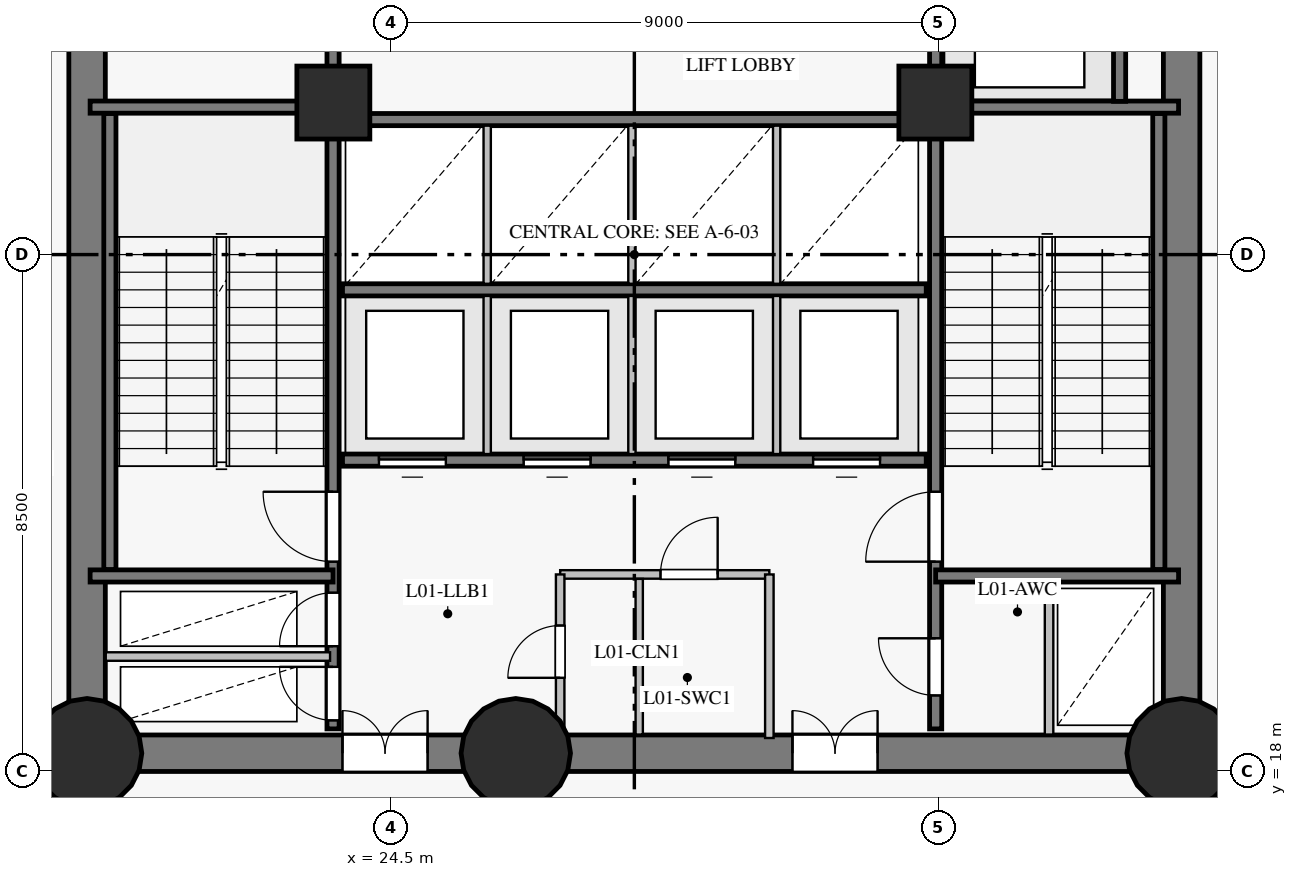
"""IFC4 building model, lengths in metres.
Left out: names, types, materials, properties, quantities, classifications, styles, units other than length and angle.
Written with IfcOpenShell. Run it as: python <this file> out.ifc"""

import sys

from ifc_helpers import new_model, si_unit, direction, frame, frame_2d, origin, origin_with_axes, origin_2d, place, context, subcontext, project, spatial, rectangle, circle, extrude, source, transform, mapped, element, fill, save


model = new_model("IFC4")
c1 = context("Model", 3, precision=1e-05, world=origin(), true_north=direction((0.0, 1.0)))
c2 = subcontext(c1, "Body", "Model", "MODEL_VIEW")
j1 = project(units=[si_unit("LENGTHUNIT", "METRE"), si_unit("PLANEANGLEUNIT", "RADIAN")], contexts=[c1])
p1 = place(None, origin())
s1 = spatial("IfcSite", under=j1, at=p1, CompositionType="ELEMENT")
p2 = place(p1, origin())
s2 = spatial("IfcBuilding", under=s1, at=p2, CompositionType="ELEMENT")
p3 = place(p2, frame((0.0, 0.0, 4.5)))
s3 = spatial("IfcBuildingStorey", under=s2, at=p3, CompositionType="ELEMENT", Elevation=4.5)
p4 = place(p3, frame((19.5, 18.3, 0.0), z_axis=(0.0, 0.0, 1.0), x_axis=(1.0, 0.0, 0.0)))
e1 = element("IfcWall", 1, at=p4, inside=s3, PredefinedType="SHEAR", context=c2, shape_type="SweptSolid", body=[
    extrude(rectangle(XDim=7.05, YDim=0.6, at=frame_2d((3.525, 0.0))), origin(), (0.0, 0.0, 1.0), 4.2),
])
p5 = place(p4, frame((4.2, 0.0, 0.0)))
e2 = element("IfcOpeningElement", 2, at=p5, cuts=e1, PredefinedType="OPENING", context=c2, shape_type="SweptSolid", body=[
    extrude(rectangle(XDim=1.4, YDim=2.2, at=frame_2d((0.7, 1.1))), frame((0.0, 0.31, 0.0), z_axis=(0.0, -1.0, 0.0), x_axis=(1.0, 0.0, 0.0)), (0.0, 0.0, 1.0), 0.62),
])
p6 = place(p3, frame((26.55, 18.3, 0.0), z_axis=(0.0, 0.0, 1.0), x_axis=(1.0, 0.0, 0.0)))
e3 = element("IfcWall", 3, at=p6, inside=s3, PredefinedType="SHEAR", context=c2, shape_type="SweptSolid", body=[
    extrude(rectangle(XDim=10.95, YDim=0.6, at=frame_2d((5.475, 0.0))), origin(), (0.0, 0.0, 1.0), 4.2),
])
p7 = place(p6, frame((4.55, 0.0, 0.0)))
e4 = element("IfcOpeningElement", 4, at=p7, cuts=e3, PredefinedType="OPENING", context=c2, shape_type="SweptSolid", body=[
    extrude(rectangle(XDim=1.4, YDim=2.2, at=frame_2d((0.7, 1.1))), frame((0.0, 0.31, 0.0), z_axis=(0.0, -1.0, 0.0), x_axis=(1.0, 0.0, 0.0)), (0.0, 0.0, 1.0), 0.62),
])
p8 = place(p3, frame((37.5, 18.3, 0.0), z_axis=(0.0, 0.0, 1.0), x_axis=(0.0, 1.0, 0.0)))
e5 = element("IfcWall", 5, at=p8, inside=s3, PredefinedType="SHEAR", context=c2, shape_type="SweptSolid", body=[
    extrude(rectangle(XDim=16.4, YDim=0.6, at=frame_2d((8.2, 0.0))), origin(), (0.0, 0.0, 1.0), 4.2),
])
p9 = place(p8, frame((13.96, 0.0, 0.0)))
e6 = element("IfcOpeningElement", 6, at=p9, cuts=e5, PredefinedType="OPENING", context=c2, shape_type="SweptSolid", body=[
    extrude(rectangle(XDim=1.2, YDim=2.15, at=frame_2d((0.6, 1.075))), frame((0.0, 0.31, 0.0), z_axis=(0.0, -1.0, 0.0), x_axis=(1.0, 0.0, 0.0)), (0.0, 0.0, 1.0), 0.62),
])
p10 = place(p3, frame((19.5, 34.7, 0.0), z_axis=(0.0, 0.0, 1.0), x_axis=(0.0, -1.0, 0.0)))
e7 = element("IfcWall", 7, at=p10, inside=s3, PredefinedType="SHEAR", context=c2, shape_type="SweptSolid", body=[
    extrude(rectangle(XDim=16.4, YDim=0.6, at=frame_2d((8.2, 0.0))), origin(), (0.0, 0.0, 1.0), 4.2),
])
p11 = place(p10, frame((3.1, 0.0, 0.0)))
e8 = element("IfcOpeningElement", 8, at=p11, cuts=e7, PredefinedType="OPENING", context=c2, shape_type="SweptSolid", body=[
    extrude(rectangle(XDim=1.1, YDim=2.15, at=frame_2d((0.55, 1.075))), frame((0.0, 0.31, 0.0), z_axis=(0.0, -1.0, 0.0), x_axis=(1.0, 0.0, 0.0)), (0.0, 0.0, 1.0), 0.62),
])
m1 = source(origin_with_axes(), c2, "Body", "SweptSolid", [
    extrude(circle(Radius=0.9, at=origin_2d()), origin(), (0.0, 0.0, 1.0), 4.5),
])
for number, where, z_axis, x_axis in (
    (9, (19.5, 18.3, 0.0), (0.0, 0.0, 1.0), (1.0, 0.0, 0.0)),
    (10, (26.55, 18.3, 0.0), (0.0, 0.0, 1.0), (1.0, 0.0, 0.0)),
    (11, (37.5, 18.3, 0.0), (0.0, 0.0, 1.0), (1.0, 0.0, 0.0)),
):
    element("IfcColumn", number, at=place(p3, frame(where, z_axis=z_axis, x_axis=x_axis)), inside=s3, PredefinedType="COLUMN", context=c2, shape_type="MappedRepresentation", body=[
        mapped(m1, transform((0.0, 0.0, 0.0), scale=1.0)),
    ])
m2 = source(origin_with_axes(), c2, "Body", "SweptSolid", [
    extrude(rectangle(XDim=1.2, YDim=1.2, at=origin_2d()), origin(), (0.0, 0.0, 1.0), 4.5),
])
for number, where, z_axis, x_axis in (
    (12, (23.55, 29.0, 0.0), (0.0, 0.0, 1.0), (1.0, 0.0, 0.0)),
    (13, (33.45, 29.0, 0.0), (0.0, 0.0, 1.0), (1.0, 0.0, 0.0)),
):
    element("IfcColumn", number, at=place(p3, frame(where, z_axis=z_axis, x_axis=x_axis)), inside=s3, PredefinedType="COLUMN", context=c2, shape_type="MappedRepresentation", body=[
        mapped(m2, transform((0.0, 0.0, 0.0), scale=1.0)),
    ])
p12 = place(p3, frame((23.545, 18.7, 0.0), z_axis=(0.0, 0.0, 1.0), x_axis=(0.0, 1.0, 0.0)))
e14 = element("IfcWall", 14, at=p12, inside=s3, PredefinedType="SHEAR", context=c2, shape_type="SweptSolid", body=[
    extrude(rectangle(XDim=15.6, YDim=0.2, at=frame_2d((7.8, 0.0))), origin(), (0.0, 0.0, 1.0), 4.2),
])
p13 = place(p12, frame((2.75, 0.0, 0.0)))
e15 = element("IfcOpeningElement", 15, at=p13, cuts=e14, PredefinedType="OPENING", context=c2, shape_type="SweptSolid", body=[
    extrude(rectangle(XDim=1.15, YDim=2.15, at=frame_2d((0.575, 1.075))), frame((0.0, 0.11, 0.0), z_axis=(0.0, -1.0, 0.0), x_axis=(1.0, 0.0, 0.0)), (0.0, 0.0, 1.0), 0.22),
])
p14 = place(p12, frame((0.14, 0.0, 0.0)))
e16 = element("IfcOpeningElement", 16, at=p14, cuts=e14, PredefinedType="OPENING", context=c2, shape_type="SweptSolid", body=[
    extrude(rectangle(XDim=0.88, YDim=2.1, at=frame_2d((0.44, 1.05))), frame((0.0, 0.11, 0.0), z_axis=(0.0, -1.0, 0.0), x_axis=(1.0, 0.0, 0.0)), (0.0, 0.0, 1.0), 0.22),
])
p15 = place(p12, frame((1.36, 0.0, 0.0)))
e17 = element("IfcOpeningElement", 17, at=p15, cuts=e14, PredefinedType="OPENING", context=c2, shape_type="SweptSolid", body=[
    extrude(rectangle(XDim=0.88, YDim=2.1, at=frame_2d((0.44, 1.05))), frame((0.0, 0.11, 0.0), z_axis=(0.0, -1.0, 0.0), x_axis=(1.0, 0.0, 0.0)), (0.0, 0.0, 1.0), 0.22),
])
p16 = place(p12, frame((12.1, 0.0, 0.0)))
e18 = element("IfcOpeningElement", 18, at=p16, cuts=e14, PredefinedType="OPENING", context=c2, shape_type="SweptSolid", body=[
    extrude(rectangle(XDim=1.12, YDim=2.15, at=frame_2d((0.56, 1.075))), frame((0.0, 0.11, 0.0), z_axis=(0.0, -1.0, 0.0), x_axis=(1.0, 0.0, 0.0)), (0.0, 0.0, 1.0), 0.22),
])
p17 = place(p12, frame((14.05, 0.0, 0.0)))
e19 = element("IfcOpeningElement", 19, at=p17, cuts=e14, PredefinedType="OPENING", context=c2, shape_type="SweptSolid", body=[
    extrude(rectangle(XDim=1.12, YDim=2.15, at=frame_2d((0.56, 1.075))), frame((0.0, 0.11, 0.0), z_axis=(0.0, -1.0, 0.0), x_axis=(1.0, 0.0, 0.0)), (0.0, 0.0, 1.0), 0.22),
])
p18 = place(p3, frame((33.455, 18.7, 0.0), z_axis=(0.0, 0.0, 1.0), x_axis=(0.0, 1.0, 0.0)))
e20 = element("IfcWall", 20, at=p18, inside=s3, PredefinedType="SHEAR", context=c2, shape_type="SweptSolid", body=[
    extrude(rectangle(XDim=15.6, YDim=0.2, at=frame_2d((7.8, 0.0))), origin(), (0.0, 0.0, 1.0), 4.2),
])
p19 = place(p18, frame((2.75, 0.0, 0.0)))
e21 = element("IfcOpeningElement", 21, at=p19, cuts=e20, PredefinedType="OPENING", context=c2, shape_type="SweptSolid", body=[
    extrude(rectangle(XDim=1.15, YDim=2.15, at=frame_2d((0.575, 1.075))), frame((0.0, 0.11, 0.0), z_axis=(0.0, -1.0, 0.0), x_axis=(1.0, 0.0, 0.0)), (0.0, 0.0, 1.0), 0.22),
])
p20 = place(p18, frame((0.55, 0.0, 0.0)))
e22 = element("IfcOpeningElement", 22, at=p20, cuts=e20, PredefinedType="OPENING", context=c2, shape_type="SweptSolid", body=[
    extrude(rectangle(XDim=0.94, YDim=2.1, at=frame_2d((0.47, 1.05))), frame((0.0, 0.11, 0.0), z_axis=(0.0, -1.0, 0.0), x_axis=(1.0, 0.0, 0.0)), (0.0, 0.0, 1.0), 0.22),
])
p21 = place(p3, frame((23.7, 23.12, 0.0), z_axis=(0.0, 0.0, 1.0), x_axis=(1.0, 0.0, 0.0)))
e23 = element("IfcWall", 23, at=p21, inside=s3, PredefinedType="SHEAR", context=c2, shape_type="SweptSolid", body=[
    extrude(rectangle(XDim=9.6, YDim=0.2, at=frame_2d((4.8, 0.0))), origin(), (0.0, 0.0, 1.0), 4.2),
])
p22 = place(p21, frame((0.6, 0.0, 0.0)))
e24 = element("IfcOpeningElement", 24, at=p22, cuts=e23, PredefinedType="OPENING", context=c2, shape_type="SweptSolid", body=[
    extrude(rectangle(XDim=1.1, YDim=2.15, at=frame_2d((0.55, 1.075))), frame((0.0, 0.11, 0.0), z_axis=(0.0, -1.0, 0.0), x_axis=(1.0, 0.0, 0.0)), (0.0, 0.0, 1.0), 0.22),
])
p23 = place(p21, frame((2.98, 0.0, 0.0)))
e25 = element("IfcOpeningElement", 25, at=p23, cuts=e23, PredefinedType="OPENING", context=c2, shape_type="SweptSolid", body=[
    extrude(rectangle(XDim=1.1, YDim=2.15, at=frame_2d((0.55, 1.075))), frame((0.0, 0.11, 0.0), z_axis=(0.0, -1.0, 0.0), x_axis=(1.0, 0.0, 0.0)), (0.0, 0.0, 1.0), 0.22),
])
p24 = place(p21, frame((5.36, 0.0, 0.0)))
e26 = element("IfcOpeningElement", 26, at=p24, cuts=e23, PredefinedType="OPENING", context=c2, shape_type="SweptSolid", body=[
    extrude(rectangle(XDim=1.1, YDim=2.15, at=frame_2d((0.55, 1.075))), frame((0.0, 0.11, 0.0), z_axis=(0.0, -1.0, 0.0), x_axis=(1.0, 0.0, 0.0)), (0.0, 0.0, 1.0), 0.22),
])
p25 = place(p21, frame((7.74, 0.0, 0.0)))
e27 = element("IfcOpeningElement", 27, at=p25, cuts=e23, PredefinedType="OPENING", context=c2, shape_type="SweptSolid", body=[
    extrude(rectangle(XDim=1.1, YDim=2.15, at=frame_2d((0.55, 1.075))), frame((0.0, 0.11, 0.0), z_axis=(0.0, -1.0, 0.0), x_axis=(1.0, 0.0, 0.0)), (0.0, 0.0, 1.0), 0.22),
])
for number, where, z_axis, x_axis in (
    (28, (23.7, 25.92, 0.0), (0.0, 0.0, 1.0), (1.0, 0.0, 0.0)),
    (29, (23.7, 28.72, 0.0), (0.0, 0.0, 1.0), (1.0, 0.0, 0.0)),
):
    element("IfcWall", number, at=place(p3, frame(where, z_axis=z_axis, x_axis=x_axis)), inside=s3, PredefinedType="SHEAR", context=c2, shape_type="SweptSolid", body=[
        extrude(rectangle(XDim=9.6, YDim=0.2, at=frame_2d((4.8, 0.0))), origin(), (0.0, 0.0, 1.0), 4.2),
    ])
for number, where, z_axis, x_axis in (
    (30, (19.875, 21.32, 0.0), (0.0, 0.0, 1.0), (0.0, 1.0, 0.0)),
    (31, (37.125, 21.32, 0.0), (0.0, 0.0, 1.0), (0.0, 1.0, 0.0)),
):
    element("IfcWall", number, at=place(p3, frame(where, z_axis=z_axis, x_axis=x_axis)), inside=s3, PredefinedType="SHEAR", context=c2, shape_type="SweptSolid", body=[
        extrude(rectangle(XDim=7.5, YDim=0.2, at=frame_2d((3.75, 0.0))), origin(), (0.0, 0.0, 1.0), 4.2),
    ])
for number, where, z_axis, x_axis in (
    (32, (33.455, 21.215, 0.0), (0.0, 0.0, 1.0), (1.0, 0.0, 0.0)),
    (33, (33.455, 28.925, 0.0), (0.0, 0.0, 1.0), (1.0, 0.0, 0.0)),
    (34, (19.55, 21.215, 0.0), (0.0, 0.0, 1.0), (1.0, 0.0, 0.0)),
    (35, (19.55, 28.925, 0.0), (0.0, 0.0, 1.0), (1.0, 0.0, 0.0)),
):
    element("IfcWall", number, at=place(p3, frame(where, z_axis=z_axis, x_axis=x_axis)), inside=s3, PredefinedType="SHEAR", context=c2, shape_type="SweptSolid", body=[
        extrude(rectangle(XDim=3.995, YDim=0.2, at=frame_2d((1.998, 0.0))), origin(), (0.0, 0.0, 1.0), 4.2),
    ])
p26 = place(p3, frame((36.48, 29.02, 0.0), z_axis=(0.0, 0.0, 1.0), x_axis=(0.0, 1.0, 0.0)))
e36 = element("IfcWall", 36, at=p26, inside=s3, PredefinedType="SHEAR", context=c2, shape_type="SweptSolid", body=[
    extrude(rectangle(XDim=2.86, YDim=0.2, at=frame_2d((1.43, 0.0))), origin(), (0.0, 0.0, 1.0), 4.2),
])
p27 = place(p3, frame((19.807, 19.89, 0.0), z_axis=(0.0, 0.0, 1.0), x_axis=(1.0, 0.0, 0.0)))
e37 = element("IfcWall", 37, at=p27, inside=s3, PredefinedType="PARTITIONING", context=c2, shape_type="SweptSolid", body=[
    extrude(rectangle(XDim=3.689, YDim=0.14, at=frame_2d((1.844, 0.0))), origin(), (0.0, 0.0, 1.0), 4.2),
])
p28 = place(p3, frame((27.28, 21.24, 0.0), z_axis=(0.0, 0.0, 1.0), x_axis=(1.0, 0.0, 0.0)))
e38 = element("IfcWall", 38, at=p28, inside=s3, PredefinedType="PARTITIONING", context=c2, shape_type="SweptSolid", body=[
    extrude(rectangle(XDim=3.44, YDim=0.14, at=frame_2d((1.72, 0.0))), origin(), (0.0, 0.0, 1.0), 4.2),
])
p29 = place(p28, frame((1.65, 0.0, 0.0)))
e39 = element("IfcOpeningElement", 39, at=p29, cuts=e38, PredefinedType="OPENING", context=c2, shape_type="SweptSolid", body=[
    extrude(rectangle(XDim=0.94, YDim=2.1, at=frame_2d((0.47, 1.05))), frame((0.0, 0.08, 0.0), z_axis=(0.0, -1.0, 0.0), x_axis=(1.0, 0.0, 0.0)), (0.0, 0.0, 1.0), 0.16),
])
p30 = place(p3, frame((27.28, 18.55, 0.0), z_axis=(0.0, 0.0, 1.0), x_axis=(0.0, 1.0, 0.0)))
e40 = element("IfcWall", 40, at=p30, inside=s3, PredefinedType="PARTITIONING", context=c2, shape_type="SweptSolid", body=[
    extrude(rectangle(XDim=2.69, YDim=0.14, at=frame_2d((1.345, 0.0))), origin(), (0.0, 0.0, 1.0), 4.2),
])
p31 = place(p30, frame((0.99, 0.0, 0.0)))
e41 = element("IfcOpeningElement", 41, at=p31, cuts=e40, PredefinedType="OPENING", context=c2, shape_type="SweptSolid", body=[
    extrude(rectangle(XDim=0.86, YDim=2.1, at=frame_2d((0.43, 1.05))), frame((0.0, 0.08, 0.0), z_axis=(0.0, -1.0, 0.0), x_axis=(1.0, 0.0, 0.0)), (0.0, 0.0, 1.0), 0.16),
])
p32 = place(p3, frame((30.72, 18.55, 0.0), z_axis=(0.0, 0.0, 1.0), x_axis=(0.0, 1.0, 0.0)))
e42 = element("IfcWall", 42, at=p32, inside=s3, PredefinedType="PARTITIONING", context=c2, shape_type="SweptSolid", body=[
    extrude(rectangle(XDim=2.69, YDim=0.14, at=frame_2d((1.345, 0.0))), origin(), (0.0, 0.0, 1.0), 4.2),
])
for number, where, z_axis, x_axis in (
    (43, (26.08, 23.22, 0.0), (0.0, 0.0, 1.0), (0.0, 1.0, 0.0)),
    (44, (28.46, 23.22, 0.0), (0.0, 0.0, 1.0), (0.0, 1.0, 0.0)),
    (45, (30.84, 23.22, 0.0), (0.0, 0.0, 1.0), (0.0, 1.0, 0.0)),
    (46, (26.08, 26.02, 0.0), (0.0, 0.0, 1.0), (0.0, 1.0, 0.0)),
    (47, (28.46, 26.02, 0.0), (0.0, 0.0, 1.0), (0.0, 1.0, 0.0)),
    (48, (30.84, 26.02, 0.0), (0.0, 0.0, 1.0), (0.0, 1.0, 0.0)),
):
    element("IfcWall", number, at=place(p3, frame(where, z_axis=z_axis, x_axis=x_axis)), inside=s3, PredefinedType="PARTITIONING", context=c2, shape_type="SweptSolid", body=[
        extrude(rectangle(XDim=2.6, YDim=0.12, at=frame_2d((1.3, 0.0))), origin(), (0.0, 0.0, 1.0), 4.2),
    ])
p33 = place(p3, frame((28.58, 18.607, 0.0), z_axis=(0.0, 0.0, 1.0), x_axis=(0.0, 1.0, 0.0)))
e49 = element("IfcWall", 49, at=p33, inside=s3, PredefinedType="PARTITIONING", context=c2, shape_type="SweptSolid", body=[
    extrude(rectangle(XDim=2.56, YDim=0.12, at=frame_2d((1.28, 0.0))), origin(), (0.0, 0.0, 1.0), 4.2),
])
p34 = place(p3, frame((35.32, 18.607, 0.0), z_axis=(0.0, 0.0, 1.0), x_axis=(0.0, 1.0, 0.0)))
e50 = element("IfcWall", 50, at=p34, inside=s3, PredefinedType="PARTITIONING", context=c2, shape_type="SweptSolid", body=[
    extrude(rectangle(XDim=2.503, YDim=0.14, at=frame_2d((1.251, 0.0))), origin(), (0.0, 0.0, 1.0), 4.2),
])
m3 = source(origin_with_axes(), c2, "Body", "SweptSolid", [
    extrude(rectangle(XDim=1.15, YDim=2.15, at=frame_2d((0.575, 1.075))), frame((0.0, 0.025, 0.0), z_axis=(0.0, -1.0, 0.0), x_axis=(1.0, 0.0, 0.0)), (0.0, 0.0, 1.0), 0.05),
])
p35 = place(p13, origin())
e51 = element("IfcDoor", 51, at=p35, inside=s3, OperationType="SINGLE_SWING_RIGHT", PredefinedType="DOOR", context=c2, shape_type="MappedRepresentation", body=[
    mapped(m3, transform((0.0, 0.0, 0.0), scale=1.0)),
])
fill(e15, e51)
p36 = place(p19, origin())
e52 = element("IfcDoor", 52, at=p36, inside=s3, OperationType="SINGLE_SWING_LEFT", PredefinedType="DOOR", context=c2, shape_type="MappedRepresentation", body=[
    mapped(m3, transform((0.0, 0.0, 0.0), scale=1.0)),
])
fill(e21, e52)
m4 = source(origin_with_axes(), c2, "Body", "SweptSolid", [
    extrude(rectangle(XDim=0.88, YDim=2.1, at=frame_2d((0.44, 1.05))), frame((0.0, 0.025, 0.0), z_axis=(0.0, -1.0, 0.0), x_axis=(1.0, 0.0, 0.0)), (0.0, 0.0, 1.0), 0.05),
])
p37 = place(p14, origin())
e53 = element("IfcDoor", 53, at=p37, inside=s3, OperationType="SINGLE_SWING_RIGHT", PredefinedType="DOOR", context=c2, shape_type="MappedRepresentation", body=[
    mapped(m4, transform((0.0, 0.0, 0.0), scale=1.0)),
])
fill(e16, e53)
p38 = place(p15, origin())
e54 = element("IfcDoor", 54, at=p38, inside=s3, OperationType="SINGLE_SWING_LEFT", PredefinedType="DOOR", context=c2, shape_type="MappedRepresentation", body=[
    mapped(m4, transform((0.0, 0.0, 0.0), scale=1.0)),
])
fill(e17, e54)
m5 = source(origin_with_axes(), c2, "Body", "SweptSolid", [
    extrude(rectangle(XDim=1.4, YDim=2.2, at=frame_2d((0.7, 1.1))), frame((0.0, 0.025, 0.0), z_axis=(0.0, -1.0, 0.0), x_axis=(1.0, 0.0, 0.0)), (0.0, 0.0, 1.0), 0.05),
])
p39 = place(p5, origin())
e55 = element("IfcDoor", 55, at=p39, inside=s3, OperationType="DOUBLE_DOOR_SINGLE_SWING", PredefinedType="DOOR", context=c2, shape_type="MappedRepresentation", body=[
    mapped(m5, transform((0.0, 0.0, 0.0), scale=1.0)),
])
fill(e2, e55)
p40 = place(p7, origin())
e56 = element("IfcDoor", 56, at=p40, inside=s3, OperationType="DOUBLE_DOOR_SINGLE_SWING", PredefinedType="DOOR", context=c2, shape_type="MappedRepresentation", body=[
    mapped(m5, transform((0.0, 0.0, 0.0), scale=1.0)),
])
fill(e4, e56)
m6 = source(origin_with_axes(), c2, "Body", "SweptSolid", [
    extrude(rectangle(XDim=0.94, YDim=2.1, at=frame_2d((0.47, 1.05))), frame((0.0, 0.025, 0.0), z_axis=(0.0, -1.0, 0.0), x_axis=(1.0, 0.0, 0.0)), (0.0, 0.0, 1.0), 0.05),
])
p41 = place(p20, origin())
e57 = element("IfcDoor", 57, at=p41, inside=s3, OperationType="SINGLE_SWING_RIGHT", PredefinedType="DOOR", context=c2, shape_type="MappedRepresentation", body=[
    mapped(m6, transform((0.0, 0.0, 0.0), scale=1.0)),
])
fill(e22, e57)
m7 = source(origin_with_axes(), c2, "Body", "SweptSolid", [
    extrude(rectangle(XDim=0.86, YDim=2.1, at=frame_2d((0.43, 1.05))), frame((0.0, 0.025, 0.0), z_axis=(0.0, -1.0, 0.0), x_axis=(1.0, 0.0, 0.0)), (0.0, 0.0, 1.0), 0.05),
])
p42 = place(p31, origin())
e58 = element("IfcDoor", 58, at=p42, inside=s3, OperationType="SINGLE_SWING_LEFT", PredefinedType="DOOR", context=c2, shape_type="MappedRepresentation", body=[
    mapped(m7, transform((0.0, 0.0, 0.0), scale=1.0)),
])
fill(e41, e58)
p43 = place(p29, origin())
e59 = element("IfcDoor", 59, at=p43, inside=s3, OperationType="SINGLE_SWING_RIGHT", PredefinedType="DOOR", context=c2, shape_type="MappedRepresentation", body=[
    mapped(m6, transform((0.0, 0.0, 0.0), scale=1.0)),
])
fill(e39, e59)
m8 = source(origin_with_axes(), c2, "Body", "SweptSolid", [
    extrude(rectangle(XDim=1.1, YDim=2.15, at=frame_2d((0.55, 1.075))), frame((0.0, 0.025, 0.0), z_axis=(0.0, -1.0, 0.0), x_axis=(1.0, 0.0, 0.0)), (0.0, 0.0, 1.0), 0.05),
])
p44 = place(p22, origin())
e60 = element("IfcDoor", 60, at=p44, inside=s3, OperationType="SLIDING_TO_LEFT", PredefinedType="DOOR", context=c2, shape_type="MappedRepresentation", body=[
    mapped(m8, transform((0.0, 0.0, 0.0), scale=1.0)),
])
fill(e24, e60)
p45 = place(p23, origin())
e61 = element("IfcDoor", 61, at=p45, inside=s3, OperationType="SLIDING_TO_RIGHT", PredefinedType="DOOR", context=c2, shape_type="MappedRepresentation", body=[
    mapped(m8, transform((0.0, 0.0, 0.0), scale=1.0)),
])
fill(e25, e61)
p46 = place(p24, origin())
e62 = element("IfcDoor", 62, at=p46, inside=s3, OperationType="SLIDING_TO_LEFT", PredefinedType="DOOR", context=c2, shape_type="MappedRepresentation", body=[
    mapped(m8, transform((0.0, 0.0, 0.0), scale=1.0)),
])
fill(e26, e62)
p47 = place(p25, origin())
e63 = element("IfcDoor", 63, at=p47, inside=s3, OperationType="SLIDING_TO_RIGHT", PredefinedType="DOOR", context=c2, shape_type="MappedRepresentation", body=[
    mapped(m8, transform((0.0, 0.0, 0.0), scale=1.0)),
])
fill(e27, e63)
save(model, sys.argv[1])
